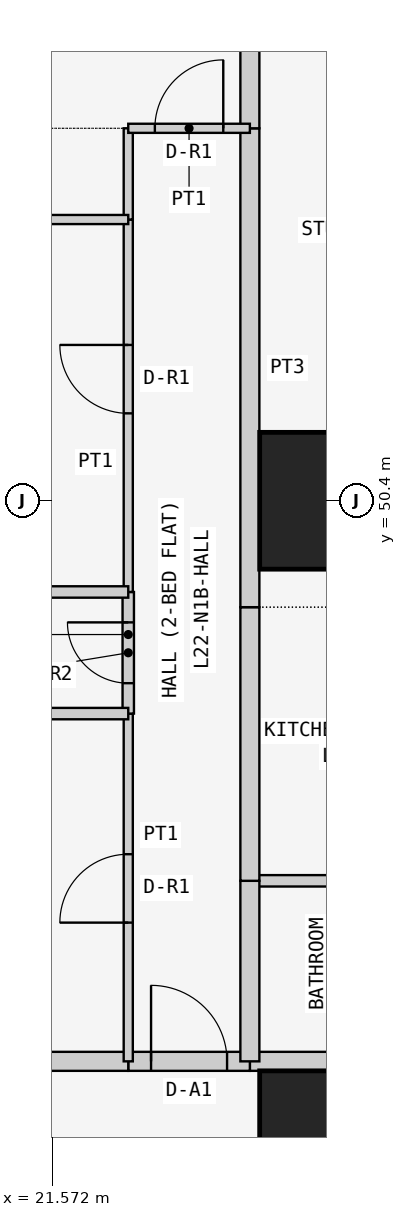
"""IFC4 building model, lengths in metres.
Left out: names, types, materials, properties, quantities, classifications, styles, units other than length and angle.
Written with IfcOpenShell. Run it as: python <this file> out.ifc"""

import sys

from ifc_helpers import new_model, si_unit, direction, frame, frame_2d, origin, origin_2d, place, context, subcontext, project, spatial, rectangle, extrude, element, fill, save


model = new_model("IFC4")
c1 = context("Model", 3, precision=1e-05, world=origin(), true_north=direction((0.0, 1.0)))
c2 = subcontext(c1, "Body", "Model", "MODEL_VIEW")
j1 = project(units=[si_unit("LENGTHUNIT", "METRE"), si_unit("PLANEANGLEUNIT", "RADIAN")], contexts=[c1])
p1 = place(None, origin())
s1 = spatial("IfcSite", under=j1, at=p1, CompositionType="ELEMENT")
p2 = place(p1, origin())
s2 = spatial("IfcBuilding", under=s1, at=p2, CompositionType="ELEMENT")
p3 = place(p2, frame((0.0, 0.0, 88.5)))
s3 = spatial("IfcBuildingStorey", under=s2, at=p3, CompositionType="ELEMENT", Elevation=88.5)
for number, where, z_axis, x_axis in (
    (1, (25.2, 42.0, 0.0), (0.0, 0.0, 1.0), (1.0, 0.0, 0.0)),
    (2, (25.2, 50.4, 0.0), (0.0, 0.0, 1.0), (1.0, 0.0, 0.0)),
):
    element("IfcColumn", number, at=place(p3, frame(where, z_axis=z_axis, x_axis=x_axis)), inside=s3, PredefinedType="COLUMN", context=c2, shape_type="SweptSolid", body=[
        extrude(rectangle(XDim=1.8, YDim=1.8, at=origin_2d()), origin(), (0.0, 0.0, 1.0), 3.6),
    ])
p4 = place(p3, frame((24.171, 43.025, 0.0), z_axis=(0.0, 0.0, 1.0), x_axis=(1.0, 0.0, 0.0)))
e3 = element("IfcWall", 3, at=p4, inside=s3, PredefinedType="PARTITIONING", context=c2, shape_type="SweptSolid", body=[
    extrude(rectangle(XDim=2.629, YDim=0.25, at=frame_2d((1.314, 0.0))), origin(), (0.0, 0.0, 1.0), 3.45),
])
p5 = place(p3, frame((22.571, 43.025, 0.0), z_axis=(0.0, 0.0, 1.0), x_axis=(1.0, 0.0, 0.0)))
e4 = element("IfcWall", 4, at=p5, inside=s3, PredefinedType="PARTITIONING", context=c2, shape_type="SweptSolid", body=[
    extrude(rectangle(XDim=1.6, YDim=0.25, at=frame_2d((0.8, 0.0))), origin(), (0.0, 0.0, 1.0), 3.45),
])
p6 = place(p5, frame((0.3, 0.0, 0.0)))
e5 = element("IfcOpeningElement", 5, at=p6, cuts=e4, PredefinedType="OPENING", context=c2, shape_type="SweptSolid", body=[
    extrude(rectangle(XDim=1.0, YDim=2.1, at=frame_2d((0.5, 1.05))), frame((0.0, 0.135, 0.0), z_axis=(0.0, -1.0, 0.0), x_axis=(1.0, 0.0, 0.0)), (0.0, 0.0, 1.0), 0.27),
])
p7 = place(p3, frame((16.1, 43.025, 0.0), z_axis=(0.0, 0.0, 1.0), x_axis=(1.0, 0.0, 0.0)))
e6 = element("IfcWall", 6, at=p7, inside=s3, PredefinedType="PARTITIONING", context=c2, shape_type="SweptSolid", body=[
    extrude(rectangle(XDim=6.471, YDim=0.25, at=frame_2d((3.235, 0.0))), origin(), (0.0, 0.0, 1.0), 3.45),
])
p8 = place(p3, frame((26.8, 45.4, 0.0), z_axis=(0.0, 0.0, 1.0), x_axis=(-1.0, 0.0, 0.0)))
e7 = element("IfcWall", 7, at=p8, inside=s3, PredefinedType="PARTITIONING", context=c2, shape_type="SweptSolid", body=[
    extrude(rectangle(XDim=2.629, YDim=0.15, at=frame_2d((1.314, 0.0))), origin(), (0.0, 0.0, 1.0), 3.45),
])
p9 = place(p3, frame((24.171, 45.4, 0.0), z_axis=(0.0, 0.0, 1.0), x_axis=(0.0, -1.0, 0.0)))
e8 = element("IfcWall", 8, at=p9, inside=s3, PredefinedType="PARTITIONING", context=c2, shape_type="SweptSolid", body=[
    extrude(rectangle(XDim=2.375, YDim=0.25, at=frame_2d((1.188, 0.0))), origin(), (0.0, 0.0, 1.0), 3.45),
])
p10 = place(p3, frame((24.171, 49.0, 0.0), z_axis=(0.0, 0.0, 1.0), x_axis=(0.0, -1.0, 0.0)))
e9 = element("IfcWall", 9, at=p10, inside=s3, PredefinedType="PARTITIONING", context=c2, shape_type="SweptSolid", body=[
    extrude(rectangle(XDim=3.6, YDim=0.25, at=frame_2d((1.8, 0.0))), origin(), (0.0, 0.0, 1.0), 3.45),
])
p11 = place(p3, frame((24.171, 55.3, 0.0), z_axis=(0.0, 0.0, 1.0), x_axis=(0.0, -1.0, 0.0)))
e10 = element("IfcWall", 10, at=p11, inside=s3, PredefinedType="PARTITIONING", context=c2, shape_type="SweptSolid", body=[
    extrude(rectangle(XDim=6.3, YDim=0.25, at=frame_2d((3.15, 0.0))), origin(), (0.0, 0.0, 1.0), 3.45),
])
p12 = place(p3, frame((24.171, 59.45, 0.0), z_axis=(0.0, 0.0, 1.0), x_axis=(0.0, -1.0, 0.0)))
e11 = element("IfcWall", 11, at=p12, inside=s3, PredefinedType="PARTITIONING", context=c2, shape_type="SweptSolid", body=[
    extrude(rectangle(XDim=4.15, YDim=0.25, at=frame_2d((2.075, 0.0))), origin(), (0.0, 0.0, 1.0), 3.45),
])
p13 = place(p3, frame((22.571, 47.6, 0.0), z_axis=(0.0, 0.0, 1.0), x_axis=(0.0, -1.0, 0.0)))
e12 = element("IfcWall", 12, at=p13, inside=s3, PredefinedType="PARTITIONING", context=c2, shape_type="SweptSolid", body=[
    extrude(rectangle(XDim=4.575, YDim=0.12, at=frame_2d((2.288, 0.0))), origin(), (0.0, 0.0, 1.0), 3.45),
])
p14 = place(p13, frame((1.85, 0.0, 0.0)))
e13 = element("IfcOpeningElement", 13, at=p14, cuts=e12, PredefinedType="OPENING", context=c2, shape_type="SweptSolid", body=[
    extrude(rectangle(XDim=0.9, YDim=2.1, at=frame_2d((0.45, 1.05))), frame((0.0, 0.07, 0.0), z_axis=(0.0, -1.0, 0.0), x_axis=(1.0, 0.0, 0.0)), (0.0, 0.0, 1.0), 0.14),
])
p15 = place(p3, frame((22.571, 49.2, 0.0), z_axis=(0.0, 0.0, 1.0), x_axis=(0.0, -1.0, 0.0)))
e14 = element("IfcWall", 14, at=p15, inside=s3, PredefinedType="PARTITIONING", context=c2, shape_type="SweptSolid", body=[
    extrude(rectangle(XDim=1.6, YDim=0.15, at=frame_2d((0.8, 0.0))), origin(), (0.0, 0.0, 1.0), 3.45),
])
p16 = place(p15, frame((0.4, 0.0, 0.0)))
e15 = element("IfcOpeningElement", 15, at=p16, cuts=e14, PredefinedType="OPENING", context=c2, shape_type="SweptSolid", body=[
    extrude(rectangle(XDim=0.8, YDim=2.1, at=frame_2d((0.4, 1.05))), frame((0.0, 0.085, 0.0), z_axis=(0.0, -1.0, 0.0), x_axis=(1.0, 0.0, 0.0)), (0.0, 0.0, 1.0), 0.17),
])
p17 = place(p3, frame((22.571, 54.1, 0.0), z_axis=(0.0, 0.0, 1.0), x_axis=(0.0, -1.0, 0.0)))
e16 = element("IfcWall", 16, at=p17, inside=s3, PredefinedType="PARTITIONING", context=c2, shape_type="SweptSolid", body=[
    extrude(rectangle(XDim=4.9, YDim=0.12, at=frame_2d((2.45, 0.0))), origin(), (0.0, 0.0, 1.0), 3.45),
])
p18 = place(p17, frame((1.65, 0.0, 0.0)))
e17 = element("IfcOpeningElement", 17, at=p18, cuts=e16, PredefinedType="OPENING", context=c2, shape_type="SweptSolid", body=[
    extrude(rectangle(XDim=0.9, YDim=2.1, at=frame_2d((0.45, 1.05))), frame((0.0, 0.07, 0.0), z_axis=(0.0, -1.0, 0.0), x_axis=(1.0, 0.0, 0.0)), (0.0, 0.0, 1.0), 0.14),
])
p19 = place(p3, frame((22.571, 55.3, 0.0), z_axis=(0.0, 0.0, 1.0), x_axis=(0.0, -1.0, 0.0)))
e18 = element("IfcWall", 18, at=p19, inside=s3, PredefinedType="PARTITIONING", context=c2, shape_type="SweptSolid", body=[
    extrude(rectangle(XDim=1.2, YDim=0.12, at=frame_2d((0.6, 0.0))), origin(), (0.0, 0.0, 1.0), 3.45),
])
p20 = place(p3, frame((24.171, 55.3, 0.0), z_axis=(0.0, 0.0, 1.0), x_axis=(-1.0, 0.0, 0.0)))
e19 = element("IfcWall", 19, at=p20, inside=s3, PredefinedType="PARTITIONING", context=c2, shape_type="SweptSolid", body=[
    extrude(rectangle(XDim=1.6, YDim=0.12, at=frame_2d((0.8, 0.0))), origin(), (0.0, 0.0, 1.0), 3.45),
])
p21 = place(p20, frame((0.35, 0.0, 0.0)))
e20 = element("IfcOpeningElement", 20, at=p21, cuts=e19, PredefinedType="OPENING", context=c2, shape_type="SweptSolid", body=[
    extrude(rectangle(XDim=0.9, YDim=2.1, at=frame_2d((0.45, 1.05))), frame((0.0, 0.07, 0.0), z_axis=(0.0, -1.0, 0.0), x_axis=(1.0, 0.0, 0.0)), (0.0, 0.0, 1.0), 0.14),
])
for number, where, z_axis, x_axis in (
    (21, (22.571, 47.6, 0.0), (0.0, 0.0, 1.0), (-1.0, 0.0, 0.0)),
    (22, (22.571, 49.2, 0.0), (0.0, 0.0, 1.0), (-1.0, 0.0, 0.0)),
):
    element("IfcWall", number, at=place(p3, frame(where, z_axis=z_axis, x_axis=x_axis)), inside=s3, PredefinedType="PARTITIONING", context=c2, shape_type="SweptSolid", body=[
        extrude(rectangle(XDim=6.471, YDim=0.15, at=frame_2d((3.235, 0.0))), origin(), (0.0, 0.0, 1.0), 3.45),
    ])
p22 = place(p3, frame((22.571, 54.1, 0.0), z_axis=(0.0, 0.0, 1.0), x_axis=(-1.0, 0.0, 0.0)))
e23 = element("IfcWall", 23, at=p22, inside=s3, PredefinedType="PARTITIONING", context=c2, shape_type="SweptSolid", body=[
    extrude(rectangle(XDim=6.471, YDim=0.12, at=frame_2d((3.235, 0.0))), origin(), (0.0, 0.0, 1.0), 3.45),
])
p23 = place(p6, origin())
e24 = element("IfcDoor", 24, at=p23, inside=s3, OperationType="SINGLE_SWING_LEFT", PredefinedType="DOOR", context=c2, shape_type="SweptSolid", body=[
    extrude(rectangle(XDim=1.0, YDim=2.1, at=frame_2d((0.5, 1.05))), frame((0.0, 0.025, 0.0), z_axis=(0.0, -1.0, 0.0), x_axis=(1.0, 0.0, 0.0)), (0.0, 0.0, 1.0), 0.05),
])
fill(e5, e24)
p24 = place(p14, frame((0.9, 0.0, 0.0), z_axis=(0.0, 0.0, 1.0), x_axis=(-1.0, 0.0, 0.0)))
e25 = element("IfcDoor", 25, at=p24, inside=s3, OperationType="SINGLE_SWING_LEFT", PredefinedType="DOOR", context=c2, shape_type="SweptSolid", body=[
    extrude(rectangle(XDim=0.9, YDim=2.1, at=frame_2d((0.45, 1.05))), frame((0.0, 0.025, 0.0), z_axis=(0.0, -1.0, 0.0), x_axis=(1.0, 0.0, 0.0)), (0.0, 0.0, 1.0), 0.05),
])
fill(e13, e25)
p25 = place(p16, frame((0.8, 0.0, 0.0), z_axis=(0.0, 0.0, 1.0), x_axis=(-1.0, 0.0, 0.0)))
e26 = element("IfcDoor", 26, at=p25, inside=s3, OperationType="SINGLE_SWING_RIGHT", PredefinedType="DOOR", context=c2, shape_type="SweptSolid", body=[
    extrude(rectangle(XDim=0.8, YDim=2.1, at=frame_2d((0.4, 1.05))), frame((0.0, 0.025, 0.0), z_axis=(0.0, -1.0, 0.0), x_axis=(1.0, 0.0, 0.0)), (0.0, 0.0, 1.0), 0.05),
])
fill(e15, e26)
p26 = place(p18, frame((0.9, 0.0, 0.0), z_axis=(0.0, 0.0, 1.0), x_axis=(-1.0, 0.0, 0.0)))
e27 = element("IfcDoor", 27, at=p26, inside=s3, OperationType="SINGLE_SWING_RIGHT", PredefinedType="DOOR", context=c2, shape_type="SweptSolid", body=[
    extrude(rectangle(XDim=0.9, YDim=2.1, at=frame_2d((0.45, 1.05))), frame((0.0, 0.025, 0.0), z_axis=(0.0, -1.0, 0.0), x_axis=(1.0, 0.0, 0.0)), (0.0, 0.0, 1.0), 0.05),
])
fill(e17, e27)
p27 = place(p21, frame((0.9, 0.0, 0.0), z_axis=(0.0, 0.0, 1.0), x_axis=(-1.0, 0.0, 0.0)))
e28 = element("IfcDoor", 28, at=p27, inside=s3, OperationType="SINGLE_SWING_RIGHT", PredefinedType="DOOR", context=c2, shape_type="SweptSolid", body=[
    extrude(rectangle(XDim=0.9, YDim=2.1, at=frame_2d((0.45, 1.05))), frame((0.0, 0.025, 0.0), z_axis=(0.0, -1.0, 0.0), x_axis=(1.0, 0.0, 0.0)), (0.0, 0.0, 1.0), 0.05),
])
fill(e20, e28)
save(model, sys.argv[1])
